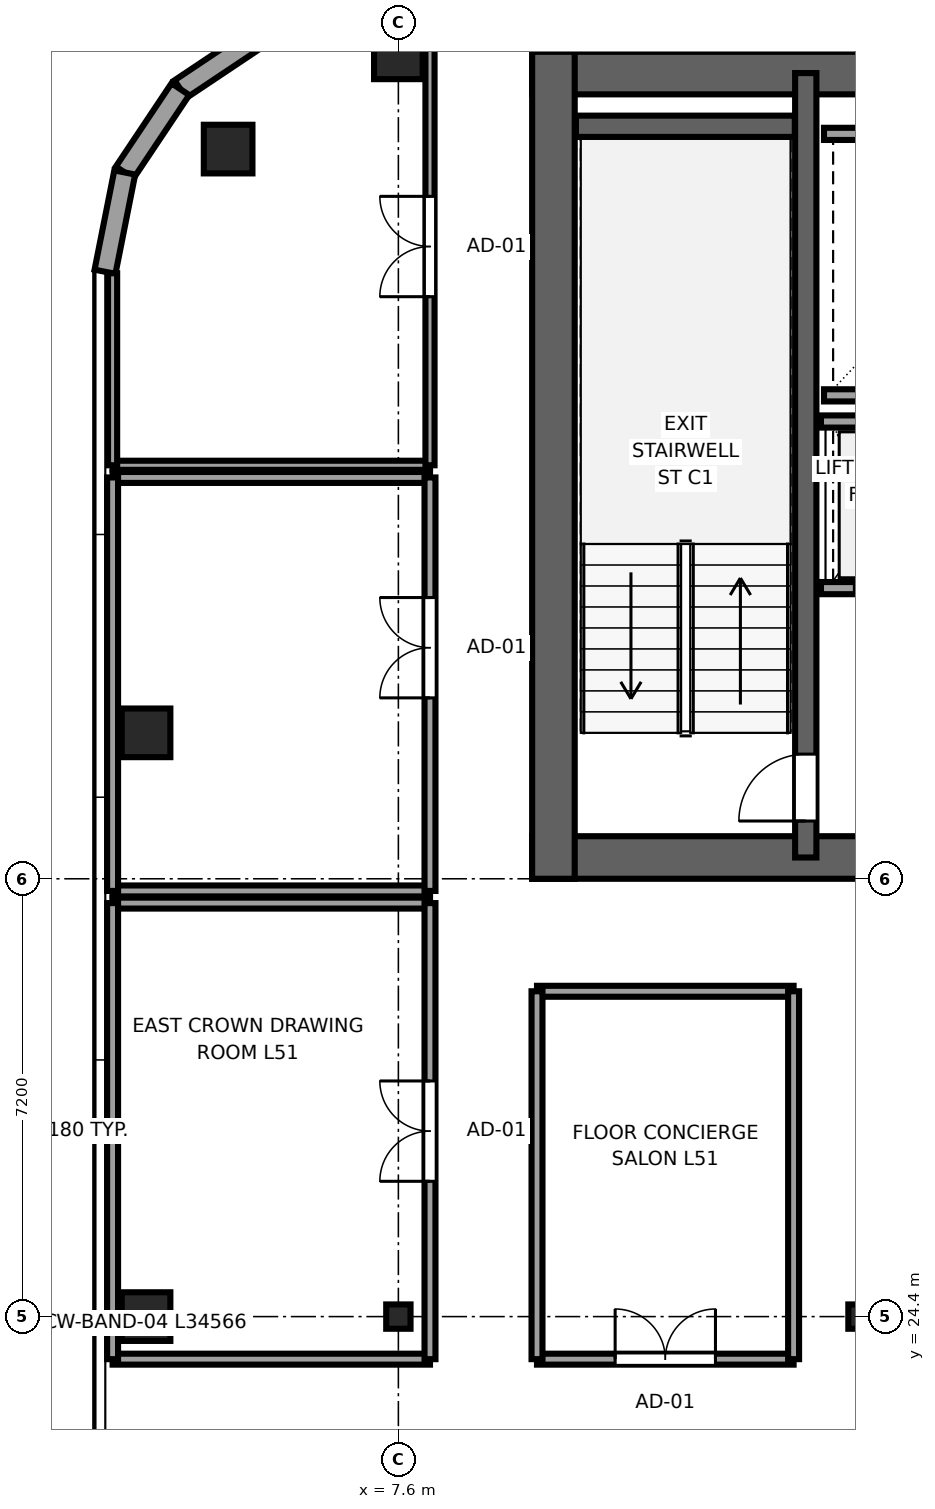
"""IFC4 building model, lengths in metres.
Left out: names, types, materials, properties, quantities, classifications, styles, units other than length and angle.
Written with IfcOpenShell. Run it as: python <this file> out.ifc"""

import sys

from ifc_helpers import new_model, si_unit, direction, frame, frame_2d, origin, origin_2d, place, context, subcontext, project, spatial, rectangle, i_section, extrude, source, transform, mapped, element, fill, save


model = new_model("IFC4")
c1 = context("Model", 3, precision=1e-05, world=origin(), true_north=direction((0.0, 1.0)))
c2 = subcontext(c1, "Body", "Model", "MODEL_VIEW")
j1 = project(units=[si_unit("LENGTHUNIT", "METRE"), si_unit("PLANEANGLEUNIT", "RADIAN")], contexts=[c1])
p1 = place(None, origin())
s1 = spatial("IfcSite", under=j1, at=p1, CompositionType="ELEMENT")
p2 = place(p1, origin())
s2 = spatial("IfcBuilding", under=s1, at=p2, CompositionType="ELEMENT")
p3 = place(p2, frame((0.0, 0.0, 194.65)))
s3 = spatial("IfcBuildingStorey", under=s2, at=p3, CompositionType="ELEMENT", Elevation=194.65)
p4 = place(p3, frame((9.8, 31.95, 0.0), z_axis=(0.0, 0.0, 1.0), x_axis=(1.0, 0.0, 0.0)))
e1 = element("IfcWall", 1, at=p4, inside=s3, PredefinedType="SHEAR", context=c2, shape_type="SweptSolid", body=[
    extrude(rectangle(XDim=26.4, YDim=0.7, at=frame_2d((13.2, 0.0))), origin(), (0.0, 0.0, 1.0), 3.55),
])
p5 = place(p4, frame((7.65, 0.0, 0.0), z_axis=(0.0, 0.0, 1.0), x_axis=(-1.0, 0.0, 0.0)))
e2 = element("IfcOpeningElement", 2, at=p5, cuts=e1, PredefinedType="OPENING", context=c2, shape_type="SweptSolid", body=[
    extrude(rectangle(XDim=1.5, YDim=2.04, at=frame_2d((0.75, 1.02))), frame((0.0, 0.36, 0.0), z_axis=(0.0, -1.0, 0.0), x_axis=(1.0, 0.0, 0.0)), (0.0, 0.0, 1.0), 0.72),
])
p6 = place(p4, frame((13.95, 0.0, 0.0), z_axis=(0.0, 0.0, 1.0), x_axis=(-1.0, 0.0, 0.0)))
e3 = element("IfcOpeningElement", 3, at=p6, cuts=e1, PredefinedType="OPENING", context=c2, shape_type="SweptSolid", body=[
    extrude(rectangle(XDim=1.5, YDim=2.04, at=frame_2d((0.75, 1.02))), frame((0.0, 0.36, 0.0), z_axis=(0.0, -1.0, 0.0), x_axis=(1.0, 0.0, 0.0)), (0.0, 0.0, 1.0), 0.72),
])
p7 = place(p4, frame((20.25, 0.0, 0.0), z_axis=(0.0, 0.0, 1.0), x_axis=(-1.0, 0.0, 0.0)))
e4 = element("IfcOpeningElement", 4, at=p7, cuts=e1, PredefinedType="OPENING", context=c2, shape_type="SweptSolid", body=[
    extrude(rectangle(XDim=1.5, YDim=2.04, at=frame_2d((0.75, 1.02))), frame((0.0, 0.36, 0.0), z_axis=(0.0, -1.0, 0.0), x_axis=(1.0, 0.0, 0.0)), (0.0, 0.0, 1.0), 0.72),
])
p8 = place(p3, frame((9.8, 44.85, 0.0), z_axis=(0.0, 0.0, 1.0), x_axis=(1.0, 0.0, 0.0)))
e5 = element("IfcWall", 5, at=p8, inside=s3, PredefinedType="SHEAR", context=c2, shape_type="SweptSolid", body=[
    extrude(rectangle(XDim=26.4, YDim=0.7, at=frame_2d((13.2, 0.0))), origin(), (0.0, 0.0, 1.0), 3.55),
])
p9 = place(p3, frame((10.15, 31.6, 0.0), z_axis=(0.0, 0.0, 1.0), x_axis=(0.0, 1.0, 0.0)))
e6 = element("IfcWall", 6, at=p9, inside=s3, PredefinedType="SHEAR", context=c2, shape_type="SweptSolid", body=[
    extrude(rectangle(XDim=13.6, YDim=0.7, at=frame_2d((6.8, 0.0))), origin(), (0.0, 0.0, 1.0), 3.55),
])
p10 = place(p3, frame((14.3, 31.95, 0.0), z_axis=(0.0, 0.0, 1.0), x_axis=(0.0, 1.0, 0.0)))
e7 = element("IfcWall", 7, at=p10, inside=s3, PredefinedType="SHEAR", context=c2, shape_type="SweptSolid", body=[
    extrude(rectangle(XDim=12.9, YDim=0.35, at=frame_2d((6.45, 0.0))), origin(), (0.0, 0.0, 1.0), 3.55),
])
p11 = place(p10, frame((0.6, 0.0, 0.0)))
e8 = element("IfcOpeningElement", 8, at=p11, cuts=e7, PredefinedType="OPENING", context=c2, shape_type="SweptSolid", body=[
    extrude(rectangle(XDim=1.1, YDim=2.12, at=frame_2d((0.55, 1.06))), frame((0.0, 0.185, 0.0), z_axis=(0.0, -1.0, 0.0), x_axis=(1.0, 0.0, 0.0)), (0.0, 0.0, 1.0), 0.37),
])
p12 = place(p3, frame((10.52, 43.975, 0.0), z_axis=(0.0, 0.0, 1.0), x_axis=(1.0, 0.0, 0.0)))
e9 = element("IfcWall", 9, at=p12, inside=s3, PredefinedType="SHEAR", context=c2, shape_type="SweptSolid", body=[
    extrude(rectangle(XDim=3.6, YDim=0.35, at=frame_2d((1.8, 0.0))), origin(), (0.0, 0.0, 1.0), 3.55),
])
m1 = source(origin(), c2, "Body", "SweptSolid", [
    extrude(rectangle(XDim=0.8, YDim=0.8, at=origin_2d()), origin(), (0.0, 0.0, 1.0), 3.55),
])
p13 = place(p3, frame((3.45, 24.4, 0.0), z_axis=(0.0, 0.0, 1.0), x_axis=(1.0, 0.0, 0.0)))
e10 = element("IfcColumn", 10, at=p13, inside=s3, PredefinedType="COLUMN", context=c2, shape_type="MappedRepresentation", body=[
    mapped(m1, transform((0.0, 0.0, 0.0), x_axis=(1.0, 0.0, 0.0), y_axis=(0.0, 1.0, 0.0), z_axis=(0.0, 0.0, 1.0), scale=1.0)),
])
m2 = source(origin(), c2, "Body", "SweptSolid", [
    extrude(i_section(OverallWidth=0.4, OverallDepth=0.4, WebThickness=0.02, FlangeThickness=0.035, at=origin_2d()), origin(), (0.0, 0.0, 1.0), 3.55),
])
for number, where, z_axis, x_axis in (
    (11, (7.6, 24.4, 0.0), (0.0, 0.0, 1.0), (1.0, 0.0, 0.0)),
    (12, (15.2, 24.4, 0.0), (0.0, 0.0, 1.0), (1.0, 0.0, 0.0)),
):
    element("IfcColumn", number, at=place(p3, frame(where, z_axis=z_axis, x_axis=x_axis)), inside=s3, PredefinedType="COLUMN", context=c2, shape_type="MappedRepresentation", body=[
        mapped(m2, transform((0.0, 0.0, 0.0), x_axis=(1.0, 0.0, 0.0), y_axis=(0.0, 1.0, 0.0), z_axis=(0.0, 0.0, 1.0), scale=1.0)),
    ])
for number, where, z_axis, x_axis in (
    (13, (4.8, 43.6, 0.0), (0.0, 0.0, 1.0), (1.0, 0.0, 0.0)),
    (14, (7.6, 45.15, 0.0), (0.0, 0.0, 1.0), (1.0, 0.0, 0.0)),
    (15, (3.45, 34.0, 0.0), (0.0, 0.0, 1.0), (1.0, 0.0, 0.0)),
):
    element("IfcColumn", number, at=place(p3, frame(where, z_axis=z_axis, x_axis=x_axis)), inside=s3, PredefinedType="COLUMN", context=c2, shape_type="MappedRepresentation", body=[
        mapped(m1, transform((0.0, 0.0, 0.0), x_axis=(1.0, 0.0, 0.0), y_axis=(0.0, 1.0, 0.0), z_axis=(0.0, 0.0, 1.0), scale=1.0)),
    ])
for number, where, z_axis, x_axis in (
    (16, (5.385, 45.5, 0.0), (0.0, 0.0, 1.0), (-0.832, -0.556, 0.0)),
    (17, (4.015, 44.585, 0.0), (0.0, 0.0, 1.0), (-0.556, -0.831, 0.0)),
):
    element("IfcWall", number, at=place(p3, frame(where, z_axis=z_axis, x_axis=x_axis)), inside=s3, PredefinedType="SOLIDWALL", context=c2, shape_type="SweptSolid", body=[
        extrude(rectangle(XDim=1.647, YDim=0.35, at=frame_2d((0.824, 0.0))), origin(), (0.0, 0.0, 1.0), 2.832),
    ])
p14 = place(p3, frame((3.1, 43.216, 0.0), z_axis=(0.0, 0.0, 1.0), x_axis=(-0.195044345786, -0.980794424524, 0.0)))
e18 = element("IfcWall", 18, at=p14, inside=s3, PredefinedType="SOLIDWALL", context=c2, shape_type="SweptSolid", body=[
    extrude(rectangle(XDim=1.665, YDim=0.35, at=frame_2d((0.833, 0.0))), origin(), (0.0, 0.0, 1.0), 3.37),
])
for number, where, z_axis, x_axis in (
    (19, (14.6, 39.55, 0.0), (0.0, 0.0, 1.0), (1.0, 0.0, 0.0)),
    (20, (14.6, 43.85, 0.0), (0.0, 0.0, 1.0), (1.0, 0.0, 0.0)),
):
    element("IfcWall", number, at=place(p3, frame(where, z_axis=z_axis, x_axis=x_axis)), inside=s3, PredefinedType="SOLIDWALL", context=c2, shape_type="SweptSolid", body=[
        extrude(rectangle(XDim=4.1, YDim=0.2, at=frame_2d((2.05, 0.0))), origin(), (0.0, 0.0, 1.0), 3.37),
    ])
p15 = place(p3, frame((14.55, 36.38, 0.0), z_axis=(0.0, 0.0, 1.0), x_axis=(1.0, 0.0, 0.0)))
e21 = element("IfcWall", 21, at=p15, inside=s3, PredefinedType="SOLIDWALL", context=c2, shape_type="SweptSolid", body=[
    extrude(rectangle(XDim=4.075, YDim=0.2, at=frame_2d((2.038, 0.0))), origin(), (0.0, 0.0, 1.0), 3.37),
])
p16 = place(p15, frame((0.55, 0.0, 0.0)))
e22 = element("IfcOpeningElement", 22, at=p16, cuts=e21, PredefinedType="OPENING", context=c2, shape_type="SweptSolid", body=[
    extrude(rectangle(XDim=1.1, YDim=2.12, at=frame_2d((0.55, 1.06))), frame((0.0, 0.11, 0.0), z_axis=(0.0, -1.0, 0.0), x_axis=(1.0, 0.0, 0.0)), (0.0, 0.0, 1.0), 0.22),
])
p17 = place(p15, frame((2.45, 0.0, 0.0)))
e23 = element("IfcOpeningElement", 23, at=p17, cuts=e21, PredefinedType="OPENING", context=c2, shape_type="SweptSolid", body=[
    extrude(rectangle(XDim=1.1, YDim=2.12, at=frame_2d((0.55, 1.06))), frame((0.0, 0.11, 0.0), z_axis=(0.0, -1.0, 0.0), x_axis=(1.0, 0.0, 0.0)), (0.0, 0.0, 1.0), 0.22),
])
p18 = place(p3, frame((14.55, 39.12, 0.0), z_axis=(0.0, 0.0, 1.0), x_axis=(1.0, 0.0, 0.0)))
e24 = element("IfcWall", 24, at=p18, inside=s3, PredefinedType="SOLIDWALL", context=c2, shape_type="SweptSolid", body=[
    extrude(rectangle(XDim=4.075, YDim=0.2, at=frame_2d((2.038, 0.0))), origin(), (0.0, 0.0, 1.0), 3.37),
])
for number, where, z_axis, x_axis in (
    (25, (2.9, 23.7, 0.0), (0.0, 0.0, 1.0), (1.0, 0.0, 0.0)),
    (26, (2.9, 31.2, 0.0), (0.0, 0.0, 1.0), (1.0, 0.0, 0.0)),
):
    element("IfcWall", number, at=place(p3, frame(where, z_axis=z_axis, x_axis=x_axis)), inside=s3, PredefinedType="PARTITIONING", context=c2, shape_type="SweptSolid", body=[
        extrude(rectangle(XDim=5.22, YDim=0.18, at=frame_2d((2.61, 0.0))), origin(), (0.0, 0.0, 1.0), 3.37),
    ])
p19 = place(p3, frame((2.9, 23.7, 0.0), z_axis=(0.0, 0.0, 1.0), x_axis=(0.0, 1.0, 0.0)))
e27 = element("IfcWall", 27, at=p19, inside=s3, PredefinedType="PARTITIONING", context=c2, shape_type="SweptSolid", body=[
    extrude(rectangle(XDim=7.5, YDim=0.18, at=frame_2d((3.75, 0.0))), origin(), (0.0, 0.0, 1.0), 3.37),
])
p20 = place(p3, frame((8.12, 23.7, 0.0), z_axis=(0.0, 0.0, 1.0), x_axis=(0.0, 1.0, 0.0)))
e28 = element("IfcWall", 28, at=p20, inside=s3, PredefinedType="PARTITIONING", context=c2, shape_type="SweptSolid", body=[
    extrude(rectangle(XDim=7.5, YDim=0.18, at=frame_2d((3.75, 0.0))), origin(), (0.0, 0.0, 1.0), 3.37),
])
p21 = place(p20, frame((2.925, 0.0, 0.0)))
e29 = element("IfcOpeningElement", 29, at=p21, cuts=e28, PredefinedType="OPENING", context=c2, shape_type="SweptSolid", body=[
    extrude(rectangle(XDim=1.65, YDim=2.15, at=frame_2d((0.825, 1.075))), frame((0.0, 0.1, 0.0), z_axis=(0.0, -1.0, 0.0), x_axis=(1.0, 0.0, 0.0)), (0.0, 0.0, 1.0), 0.2),
])
for number, where, z_axis, x_axis in (
    (30, (2.9, 31.4, 0.0), (0.0, 0.0, 1.0), (1.0, 0.0, 0.0)),
    (31, (2.9, 38.2, 0.0), (0.0, 0.0, 1.0), (1.0, 0.0, 0.0)),
):
    element("IfcWall", number, at=place(p3, frame(where, z_axis=z_axis, x_axis=x_axis)), inside=s3, PredefinedType="PARTITIONING", context=c2, shape_type="SweptSolid", body=[
        extrude(rectangle(XDim=5.22, YDim=0.18, at=frame_2d((2.61, 0.0))), origin(), (0.0, 0.0, 1.0), 3.37),
    ])
p22 = place(p3, frame((2.9, 31.4, 0.0), z_axis=(0.0, 0.0, 1.0), x_axis=(0.0, 1.0, 0.0)))
e32 = element("IfcWall", 32, at=p22, inside=s3, PredefinedType="PARTITIONING", context=c2, shape_type="SweptSolid", body=[
    extrude(rectangle(XDim=6.8, YDim=0.18, at=frame_2d((3.4, 0.0))), origin(), (0.0, 0.0, 1.0), 3.37),
])
p23 = place(p3, frame((8.12, 31.4, 0.0), z_axis=(0.0, 0.0, 1.0), x_axis=(0.0, 1.0, 0.0)))
e33 = element("IfcWall", 33, at=p23, inside=s3, PredefinedType="PARTITIONING", context=c2, shape_type="SweptSolid", body=[
    extrude(rectangle(XDim=6.8, YDim=0.18, at=frame_2d((3.4, 0.0))), origin(), (0.0, 0.0, 1.0), 3.37),
])
p24 = place(p23, frame((3.175, 0.0, 0.0)))
e34 = element("IfcOpeningElement", 34, at=p24, cuts=e33, PredefinedType="OPENING", context=c2, shape_type="SweptSolid", body=[
    extrude(rectangle(XDim=1.65, YDim=2.15, at=frame_2d((0.825, 1.075))), frame((0.0, 0.1, 0.0), z_axis=(0.0, -1.0, 0.0), x_axis=(1.0, 0.0, 0.0)), (0.0, 0.0, 1.0), 0.2),
])
p25 = place(p3, frame((2.9, 38.4, 0.0), z_axis=(0.0, 0.0, 1.0), x_axis=(1.0, 0.0, 0.0)))
e35 = element("IfcWall", 35, at=p25, inside=s3, PredefinedType="PARTITIONING", context=c2, shape_type="SweptSolid", body=[
    extrude(rectangle(XDim=5.22, YDim=0.15, at=frame_2d((2.61, 0.0))), origin(), (0.0, 0.0, 1.0), 3.37),
])
p26 = place(p3, frame((2.9, 38.4, 0.0), z_axis=(0.0, 0.0, 1.0), x_axis=(0.0, 1.0, 0.0)))
e36 = element("IfcWall", 36, at=p26, inside=s3, PredefinedType="PARTITIONING", context=c2, shape_type="SweptSolid", body=[
    extrude(rectangle(XDim=3.158, YDim=0.15, at=frame_2d((1.579, 0.0))), origin(), (0.0, 0.0, 1.0), 3.37),
])
p27 = place(p3, frame((8.12, 38.4, 0.0), z_axis=(0.0, 0.0, 1.0), x_axis=(0.0, 1.0, 0.0)))
e37 = element("IfcWall", 37, at=p27, inside=s3, PredefinedType="PARTITIONING", context=c2, shape_type="SweptSolid", body=[
    extrude(rectangle(XDim=7.195, YDim=0.15, at=frame_2d((3.598, 0.0))), origin(), (0.0, 0.0, 1.0), 3.37),
])
p28 = place(p27, frame((2.772, 0.0, 0.0)))
e38 = element("IfcOpeningElement", 38, at=p28, cuts=e37, PredefinedType="OPENING", context=c2, shape_type="SweptSolid", body=[
    extrude(rectangle(XDim=1.65, YDim=2.15, at=frame_2d((0.825, 1.075))), frame((0.0, 0.085, 0.0), z_axis=(0.0, -1.0, 0.0), x_axis=(1.0, 0.0, 0.0)), (0.0, 0.0, 1.0), 0.17),
])
p29 = place(p3, frame((9.88, 23.7, 0.0), z_axis=(0.0, 0.0, 1.0), x_axis=(1.0, 0.0, 0.0)))
e39 = element("IfcWall", 39, at=p29, inside=s3, PredefinedType="PARTITIONING", context=c2, shape_type="SweptSolid", body=[
    extrude(rectangle(XDim=4.22, YDim=0.18, at=frame_2d((2.11, 0.0))), origin(), (0.0, 0.0, 1.0), 3.37),
])
p30 = place(p29, frame((1.285, 0.0, 0.0)))
e40 = element("IfcOpeningElement", 40, at=p30, cuts=e39, PredefinedType="OPENING", context=c2, shape_type="SweptSolid", body=[
    extrude(rectangle(XDim=1.65, YDim=2.15, at=frame_2d((0.825, 1.075))), frame((0.0, 0.1, 0.0), z_axis=(0.0, -1.0, 0.0), x_axis=(1.0, 0.0, 0.0)), (0.0, 0.0, 1.0), 0.2),
])
p31 = place(p3, frame((9.88, 29.75, 0.0), z_axis=(0.0, 0.0, 1.0), x_axis=(1.0, 0.0, 0.0)))
e41 = element("IfcWall", 41, at=p31, inside=s3, PredefinedType="PARTITIONING", context=c2, shape_type="SweptSolid", body=[
    extrude(rectangle(XDim=4.22, YDim=0.18, at=frame_2d((2.11, 0.0))), origin(), (0.0, 0.0, 1.0), 3.37),
])
for number, where, z_axis, x_axis in (
    (42, (9.88, 23.7, 0.0), (0.0, 0.0, 1.0), (0.0, 1.0, 0.0)),
    (43, (14.1, 23.7, 0.0), (0.0, 0.0, 1.0), (0.0, 1.0, 0.0)),
):
    element("IfcWall", number, at=place(p3, frame(where, z_axis=z_axis, x_axis=x_axis)), inside=s3, PredefinedType="PARTITIONING", context=c2, shape_type="SweptSolid", body=[
        extrude(rectangle(XDim=6.05, YDim=0.18, at=frame_2d((3.025, 0.0))), origin(), (0.0, 0.0, 1.0), 3.37),
    ])
m3 = source(origin(), c2, "Body", "SweptSolid", [
    extrude(rectangle(XDim=1.1, YDim=2.12, at=frame_2d((0.55, 1.06))), frame((0.0, 0.025, 0.0), z_axis=(0.0, -1.0, 0.0), x_axis=(1.0, 0.0, 0.0)), (0.0, 0.0, 1.0), 0.05),
])
p32 = place(p11, origin())
e44 = element("IfcDoor", 44, at=p32, inside=s3, OperationType="SINGLE_SWING_LEFT", PredefinedType="DOOR", context=c2, shape_type="MappedRepresentation", body=[
    mapped(m3, transform((0.0, 0.0, 0.0), x_axis=(1.0, 0.0, 0.0), y_axis=(0.0, 1.0, 0.0), z_axis=(0.0, 0.0, 1.0), scale=1.0)),
])
fill(e8, e44)
m4 = source(origin(), c2, "Body", "SweptSolid", [
    extrude(rectangle(XDim=1.65, YDim=2.15, at=frame_2d((0.825, 1.075))), frame((0.0, 0.025, 0.0), z_axis=(0.0, -1.0, 0.0), x_axis=(1.0, 0.0, 0.0)), (0.0, 0.0, 1.0), 0.05),
])
p33 = place(p21, origin())
e45 = element("IfcDoor", 45, at=p33, inside=s3, OperationType="DOUBLE_DOOR_SINGLE_SWING", PredefinedType="DOOR", context=c2, shape_type="MappedRepresentation", body=[
    mapped(m4, transform((0.0, 0.0, 0.0), x_axis=(1.0, 0.0, 0.0), y_axis=(0.0, 1.0, 0.0), z_axis=(0.0, 0.0, 1.0), scale=1.0)),
])
fill(e29, e45)
p34 = place(p24, origin())
e46 = element("IfcDoor", 46, at=p34, inside=s3, OperationType="DOUBLE_DOOR_SINGLE_SWING", PredefinedType="DOOR", context=c2, shape_type="MappedRepresentation", body=[
    mapped(m4, transform((0.0, 0.0, 0.0), x_axis=(1.0, 0.0, 0.0), y_axis=(0.0, 1.0, 0.0), z_axis=(0.0, 0.0, 1.0), scale=1.0)),
])
fill(e34, e46)
p35 = place(p28, origin())
e47 = element("IfcDoor", 47, at=p35, inside=s3, OperationType="DOUBLE_DOOR_SINGLE_SWING", PredefinedType="DOOR", context=c2, shape_type="MappedRepresentation", body=[
    mapped(m4, transform((0.0, 0.0, 0.0), x_axis=(1.0, 0.0, 0.0), y_axis=(0.0, 1.0, 0.0), z_axis=(0.0, 0.0, 1.0), scale=1.0)),
])
fill(e38, e47)
p36 = place(p30, origin())
e48 = element("IfcDoor", 48, at=p36, inside=s3, OperationType="DOUBLE_DOOR_SINGLE_SWING", PredefinedType="DOOR", context=c2, shape_type="MappedRepresentation", body=[
    mapped(m4, transform((0.0, 0.0, 0.0), x_axis=(1.0, 0.0, 0.0), y_axis=(0.0, 1.0, 0.0), z_axis=(0.0, 0.0, 1.0), scale=1.0)),
])
fill(e40, e48)
save(model, sys.argv[1])
